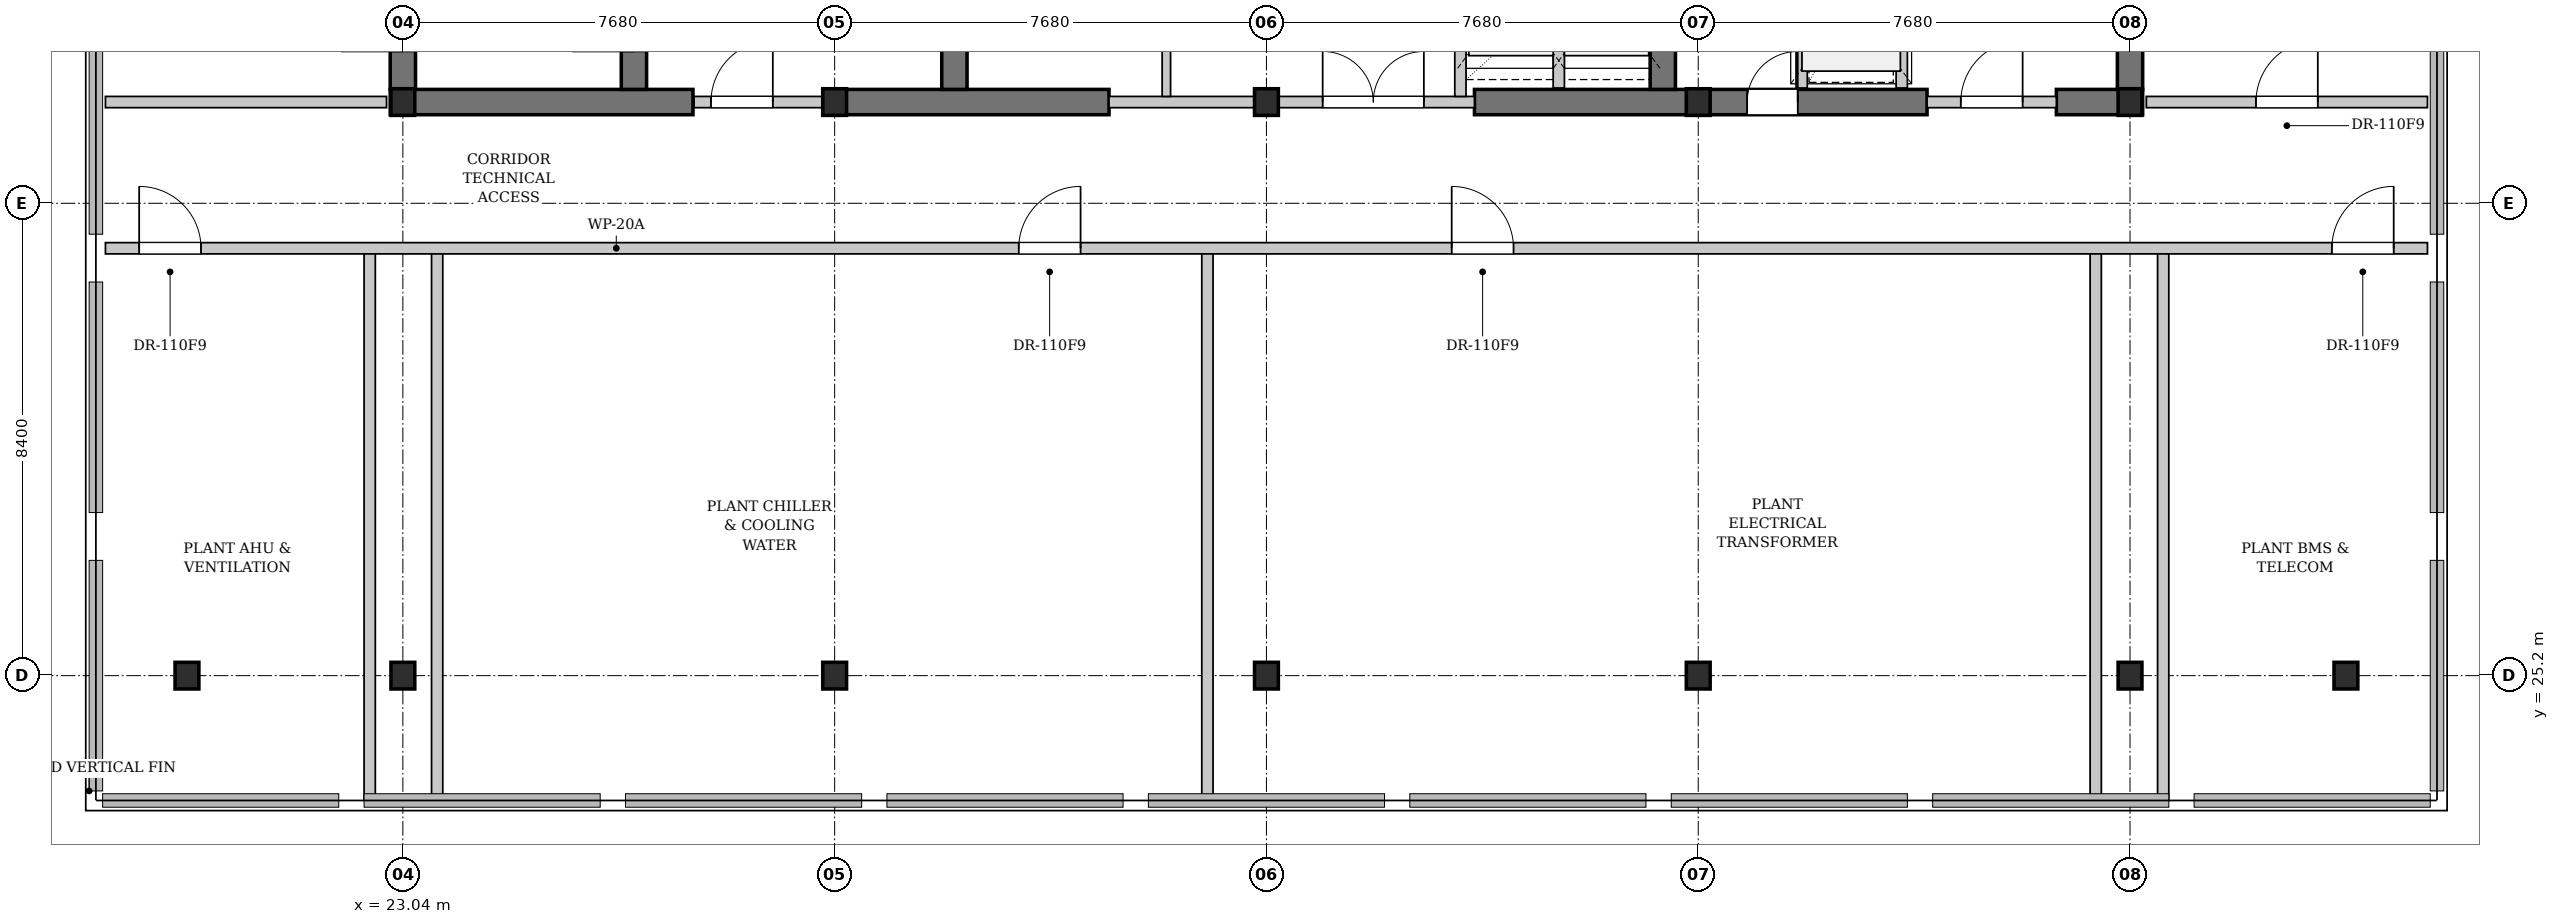
"""IFC4 building model, lengths in metres.
Left out: names, types, materials, properties, quantities, classifications, styles, units other than length and angle.
Written with IfcOpenShell. Run it as: python <this file> out.ifc"""

import sys

from ifc_helpers import new_model, si_unit, direction, frame, frame_2d, origin, origin_2d, place, context, subcontext, project, spatial, rectangle, i_section, extrude, element, fill, save


model = new_model("IFC4")
c1 = context("Model", 3, precision=1e-05, world=origin(), true_north=direction((0.0, 1.0)))
c2 = subcontext(c1, "Body", "Model", "MODEL_VIEW")
j1 = project(units=[si_unit("LENGTHUNIT", "METRE"), si_unit("PLANEANGLEUNIT", "RADIAN")], contexts=[c1])
p1 = place(None, origin())
s1 = spatial("IfcSite", under=j1, at=p1, CompositionType="ELEMENT")
p2 = place(p1, origin())
s2 = spatial("IfcBuilding", under=s1, at=p2, CompositionType="ELEMENT")
p3 = place(p2, frame((0.0, 0.0, 141.2)))
s3 = spatial("IfcBuildingStorey", under=s2, at=p3, CompositionType="ELEMENT", Elevation=141.2)
p4 = place(p3, frame((22.815, 35.4, 0.0), z_axis=(0.0, 0.0, 1.0), x_axis=(1.0, 0.0, 0.0)))
e1 = element("IfcWall", 1, at=p4, inside=s3, PredefinedType="SHEAR", context=c2, shape_type="SweptSolid", body=[
    extrude(rectangle(XDim=5.385, YDim=0.45, at=frame_2d((2.692, 0.0))), origin(), (0.0, 0.0, 1.0), 3.48),
])
p5 = place(p3, frame((30.72, 35.4, 0.0), z_axis=(0.0, 0.0, 1.0), x_axis=(1.0, 0.0, 0.0)))
e2 = element("IfcWall", 2, at=p5, inside=s3, PredefinedType="SHEAR", context=c2, shape_type="SweptSolid", body=[
    extrude(rectangle(XDim=4.88, YDim=0.45, at=frame_2d((2.44, 0.0))), origin(), (0.0, 0.0, 1.0), 3.48),
])
p6 = place(p3, frame((42.1, 35.4, 0.0), z_axis=(0.0, 0.0, 1.0), x_axis=(1.0, 0.0, 0.0)))
e3 = element("IfcWall", 3, at=p6, inside=s3, PredefinedType="SHEAR", context=c2, shape_type="SweptSolid", body=[
    extrude(rectangle(XDim=8.05, YDim=0.45, at=frame_2d((4.025, 0.0))), origin(), (0.0, 0.0, 1.0), 3.48),
])
p7 = place(p6, frame((4.85, 0.0, 0.0)))
e4 = element("IfcOpeningElement", 4, at=p7, cuts=e3, PredefinedType="OPENING", context=c2, shape_type="SweptSolid", body=[
    extrude(rectangle(XDim=0.9, YDim=2.15, at=frame_2d((0.45, 1.075))), frame((0.0, 0.235, 0.0), z_axis=(0.0, -1.0, 0.0), x_axis=(1.0, 0.0, 0.0)), (0.0, 0.0, 1.0), 0.47),
])
p8 = place(p3, frame((52.45, 35.4, 0.0), z_axis=(0.0, 0.0, 1.0), x_axis=(1.0, 0.0, 0.0)))
e5 = element("IfcWall", 5, at=p8, inside=s3, PredefinedType="SHEAR", context=c2, shape_type="SweptSolid", body=[
    extrude(rectangle(XDim=1.535, YDim=0.45, at=frame_2d((0.768, 0.0))), origin(), (0.0, 0.0, 1.0), 3.48),
])
p9 = place(p3, frame((23.04, 35.625, 0.0), z_axis=(0.0, 0.0, 1.0), x_axis=(0.0, 1.0, 0.0)))
e6 = element("IfcWall", 6, at=p9, inside=s3, PredefinedType="SHEAR", context=c2, shape_type="SweptSolid", body=[
    extrude(rectangle(XDim=10.35, YDim=0.45, at=frame_2d((5.175, 0.0))), origin(), (0.0, 0.0, 1.0), 3.48),
])
p10 = place(p9, frame((0.675, 0.0, 0.0)))
e7 = element("IfcOpeningElement", 7, at=p10, cuts=e6, PredefinedType="OPENING", context=c2, shape_type="SweptSolid", body=[
    extrude(rectangle(XDim=1.1, YDim=2.15, at=frame_2d((0.55, 1.075))), frame((0.0, 0.235, 0.0), z_axis=(0.0, -1.0, 0.0), x_axis=(1.0, 0.0, 0.0)), (0.0, 0.0, 1.0), 0.47),
])
p11 = place(p3, frame((27.15, 35.625, 0.0), z_axis=(0.0, 0.0, 1.0), x_axis=(0.0, 1.0, 0.0)))
e8 = element("IfcWall", 8, at=p11, inside=s3, PredefinedType="SHEAR", context=c2, shape_type="SweptSolid", body=[
    extrude(rectangle(XDim=10.35, YDim=0.45, at=frame_2d((5.175, 0.0))), origin(), (0.0, 0.0, 1.0), 3.48),
])
p12 = place(p11, frame((0.675, 0.0, 0.0)))
e9 = element("IfcOpeningElement", 9, at=p12, cuts=e8, PredefinedType="OPENING", context=c2, shape_type="SweptSolid", body=[
    extrude(rectangle(XDim=1.1, YDim=2.15, at=frame_2d((0.55, 1.075))), frame((0.0, 0.235, 0.0), z_axis=(0.0, -1.0, 0.0), x_axis=(1.0, 0.0, 0.0)), (0.0, 0.0, 1.0), 0.47),
])
for number, where, z_axis, x_axis in (
    (10, (32.85, 35.625, 0.0), (0.0, 0.0, 1.0), (0.0, 1.0, 0.0)),
    (11, (45.45, 35.625, 0.0), (0.0, 0.0, 1.0), (0.0, 1.0, 0.0)),
    (12, (53.76, 35.625, 0.0), (0.0, 0.0, 1.0), (0.0, 1.0, 0.0)),
):
    element("IfcWall", number, at=place(p3, frame(where, z_axis=z_axis, x_axis=x_axis)), inside=s3, PredefinedType="SHEAR", context=c2, shape_type="SweptSolid", body=[
        extrude(rectangle(XDim=10.35, YDim=0.45, at=frame_2d((5.175, 0.0))), origin(), (0.0, 0.0, 1.0), 3.48),
    ])
for number, where, z_axis, x_axis in (
    (13, (23.04, 35.4, 0.0), (0.0, 0.0, 1.0), (1.0, 0.0, 0.0)),
    (14, (23.04, 25.2, 0.0), (0.0, 0.0, 1.0), (1.0, 0.0, 0.0)),
    (15, (30.72, 35.4, 0.0), (0.0, 0.0, 1.0), (1.0, 0.0, 0.0)),
    (16, (30.72, 25.2, 0.0), (0.0, 0.0, 1.0), (1.0, 0.0, 0.0)),
    (17, (38.4, 35.4, 0.0), (0.0, 0.0, 1.0), (1.0, 0.0, 0.0)),
    (18, (38.4, 25.2, 0.0), (0.0, 0.0, 1.0), (1.0, 0.0, 0.0)),
    (19, (46.08, 35.4, 0.0), (0.0, 0.0, 1.0), (1.0, 0.0, 0.0)),
    (20, (46.08, 25.2, 0.0), (0.0, 0.0, 1.0), (1.0, 0.0, 0.0)),
    (21, (53.76, 35.4, 0.0), (0.0, 0.0, 1.0), (1.0, 0.0, 0.0)),
    (22, (53.76, 25.2, 0.0), (0.0, 0.0, 1.0), (1.0, 0.0, 0.0)),
    (23, (19.2, 25.2, 0.0), (0.0, 0.0, 1.0), (1.0, 0.0, 0.0)),
    (24, (57.6, 25.2, 0.0), (0.0, 0.0, 1.0), (1.0, 0.0, 0.0)),
):
    element("IfcColumn", number, at=place(p3, frame(where, z_axis=z_axis, x_axis=x_axis)), inside=s3, PredefinedType="COLUMN", context=c2, shape_type="SweptSolid", body=[
        extrude(i_section(OverallWidth=0.424, OverallDepth=0.474, WebThickness=0.047, FlangeThickness=0.077, FilletRadius=0.015, at=origin_2d()), origin(), (0.0, 0.0, 1.0), 3.9),
    ])
p13 = place(p3, frame((28.22, 35.4, 0.0), z_axis=(0.0, 0.0, 1.0), x_axis=(1.0, 0.0, 0.0)))
e25 = element("IfcWall", 25, at=p13, inside=s3, PredefinedType="PARTITIONING", context=c2, shape_type="SweptSolid", body=[
    extrude(rectangle(XDim=2.5, YDim=0.2, at=frame_2d((1.25, 0.0))), origin(), (0.0, 0.0, 1.0), 2.565),
])
p14 = place(p13, frame((0.3, 0.0, 0.0)))
e26 = element("IfcOpeningElement", 26, at=p14, cuts=e25, PredefinedType="OPENING", context=c2, shape_type="SweptSolid", body=[
    extrude(rectangle(XDim=1.1, YDim=2.15, at=frame_2d((0.55, 1.075))), frame((0.0, 0.11, 0.0), z_axis=(0.0, -1.0, 0.0), x_axis=(1.0, 0.0, 0.0)), (0.0, 0.0, 1.0), 0.22),
])
p15 = place(p3, frame((35.6, 35.4, 0.0), z_axis=(0.0, 0.0, 1.0), x_axis=(1.0, 0.0, 0.0)))
e27 = element("IfcWall", 27, at=p15, inside=s3, PredefinedType="PARTITIONING", context=c2, shape_type="SweptSolid", body=[
    extrude(rectangle(XDim=6.5, YDim=0.2, at=frame_2d((3.25, 0.0))), origin(), (0.0, 0.0, 1.0), 2.565),
])
p16 = place(p15, frame((3.8, 0.0, 0.0)))
e28 = element("IfcOpeningElement", 28, at=p16, cuts=e27, PredefinedType="OPENING", context=c2, shape_type="SweptSolid", body=[
    extrude(rectangle(XDim=1.8, YDim=2.3, at=frame_2d((0.9, 1.15))), frame((0.0, 0.11, 0.0), z_axis=(0.0, -1.0, 0.0), x_axis=(1.0, 0.0, 0.0)), (0.0, 0.0, 1.0), 0.22),
])
p17 = place(p3, frame((36.62, 35.5, 0.0), z_axis=(0.0, 0.0, 1.0), x_axis=(0.0, 1.0, 0.0)))
e29 = element("IfcWall", 29, at=p17, inside=s3, PredefinedType="PARTITIONING", context=c2, shape_type="SweptSolid", body=[
    extrude(rectangle(XDim=10.42, YDim=0.15, at=frame_2d((5.21, 0.0))), origin(), (0.0, 0.0, 1.0), 3.48),
])
p18 = place(p17, frame((3.92, 0.0, 0.0)))
e30 = element("IfcOpeningElement", 30, at=p18, cuts=e29, PredefinedType="OPENING", context=c2, shape_type="SweptSolid", body=[
    extrude(rectangle(XDim=0.9, YDim=2.15, at=frame_2d((0.45, 1.075))), frame((0.0, 0.085, 0.0), z_axis=(0.0, -1.0, 0.0), x_axis=(1.0, 0.0, 0.0)), (0.0, 0.0, 1.0), 0.17),
])
p19 = place(p17, frame((5.85, 0.0, 0.0)))
e31 = element("IfcOpeningElement", 31, at=p19, cuts=e29, PredefinedType="OPENING", context=c2, shape_type="SweptSolid", body=[
    extrude(rectangle(XDim=0.9, YDim=2.15, at=frame_2d((0.45, 1.075))), frame((0.0, 0.085, 0.0), z_axis=(0.0, -1.0, 0.0), x_axis=(1.0, 0.0, 0.0)), (0.0, 0.0, 1.0), 0.17),
])
p20 = place(p3, frame((43.6, 35.65, 0.0), z_axis=(0.0, 0.0, 1.0), x_axis=(0.0, 1.0, 0.0)))
e32 = element("IfcWall", 32, at=p20, inside=s3, PredefinedType="PARTITIONING", context=c2, shape_type="SweptSolid", body=[
    extrude(rectangle(XDim=3.25, YDim=0.2, at=frame_2d((1.625, 0.0))), origin(), (0.0, 0.0, 1.0), 3.48),
])
p21 = place(p3, frame((41.85, 35.5, 0.0), z_axis=(0.0, 0.0, 1.0), x_axis=(0.0, 1.0, 0.0)))
e33 = element("IfcWall", 33, at=p21, inside=s3, PredefinedType="PARTITIONING", context=c2, shape_type="SweptSolid", body=[
    extrude(rectangle(XDim=3.4, YDim=0.2, at=frame_2d((1.7, 0.0))), origin(), (0.0, 0.0, 1.0), 3.48),
])
p22 = place(p3, frame((50.15, 35.4, 0.0), z_axis=(0.0, 0.0, 1.0), x_axis=(1.0, 0.0, 0.0)))
e34 = element("IfcWall", 34, at=p22, inside=s3, PredefinedType="PARTITIONING", context=c2, shape_type="SweptSolid", body=[
    extrude(rectangle(XDim=2.3, YDim=0.2, at=frame_2d((1.15, 0.0))), origin(), (0.0, 0.0, 1.0), 2.565),
])
p23 = place(p22, frame((0.6, 0.0, 0.0)))
e35 = element("IfcOpeningElement", 35, at=p23, cuts=e34, PredefinedType="OPENING", context=c2, shape_type="SweptSolid", body=[
    extrude(rectangle(XDim=1.1, YDim=2.15, at=frame_2d((0.55, 1.075))), frame((0.0, 0.11, 0.0), z_axis=(0.0, -1.0, 0.0), x_axis=(1.0, 0.0, 0.0)), (0.0, 0.0, 1.0), 0.22),
])
p24 = place(p3, frame((49.7, 35.65, 0.0), z_axis=(0.0, 0.0, 1.0), x_axis=(0.0, 1.0, 0.0)))
e36 = element("IfcWall", 36, at=p24, inside=s3, PredefinedType="PARTITIONING", context=c2, shape_type="SweptSolid", body=[
    extrude(rectangle(XDim=3.15, YDim=0.2, at=frame_2d((1.575, 0.0))), origin(), (0.0, 0.0, 1.0), 3.48),
])
p25 = place(p24, frame((0.85, 0.0, 0.0)))
e37 = element("IfcOpeningElement", 37, at=p25, cuts=e36, PredefinedType="OPENING", context=c2, shape_type="SweptSolid", body=[
    extrude(rectangle(XDim=1.2, YDim=2.2, at=frame_2d((0.6, 1.1))), frame((0.0, 0.11, 0.0), z_axis=(0.0, -1.0, 0.0), x_axis=(1.0, 0.0, 0.0)), (0.0, 0.0, 1.0), 0.22),
])
p26 = place(p3, frame((47.92, 35.65, 0.0), z_axis=(0.0, 0.0, 1.0), x_axis=(0.0, 1.0, 0.0)))
e38 = element("IfcWall", 38, at=p26, inside=s3, PredefinedType="PARTITIONING", context=c2, shape_type="SweptSolid", body=[
    extrude(rectangle(XDim=3.15, YDim=0.2, at=frame_2d((1.575, 0.0))), origin(), (0.0, 0.0, 1.0), 3.48),
])
p27 = place(p3, frame((17.75, 35.4, 0.0), z_axis=(0.0, 0.0, 1.0), x_axis=(1.0, 0.0, 0.0)))
e39 = element("IfcWall", 39, at=p27, inside=s3, PredefinedType="PARTITIONING", context=c2, shape_type="SweptSolid", body=[
    extrude(rectangle(XDim=5.0, YDim=0.2, at=frame_2d((2.5, 0.0))), origin(), (0.0, 0.0, 1.0), 3.48),
])
p28 = place(p3, frame((54.05, 35.4, 0.0), z_axis=(0.0, 0.0, 1.0), x_axis=(1.0, 0.0, 0.0)))
e40 = element("IfcWall", 40, at=p28, inside=s3, PredefinedType="PARTITIONING", context=c2, shape_type="SweptSolid", body=[
    extrude(rectangle(XDim=5.0, YDim=0.2, at=frame_2d((2.5, 0.0))), origin(), (0.0, 0.0, 1.0), 3.48),
])
p29 = place(p28, frame((1.95, 0.0, 0.0)))
e41 = element("IfcOpeningElement", 41, at=p29, cuts=e40, PredefinedType="OPENING", context=c2, shape_type="SweptSolid", body=[
    extrude(rectangle(XDim=1.1, YDim=2.15, at=frame_2d((0.55, 1.075))), frame((0.0, 0.11, 0.0), z_axis=(0.0, -1.0, 0.0), x_axis=(1.0, 0.0, 0.0)), (0.0, 0.0, 1.0), 0.22),
])
for number, where, z_axis, x_axis in (
    (42, (22.45, 22.98, 0.0), (0.0, 0.0, 1.0), (0.0, 1.0, 0.0)),
    (43, (23.65, 22.98, 0.0), (0.0, 0.0, 1.0), (0.0, 1.0, 0.0)),
    (44, (37.35, 22.98, 0.0), (0.0, 0.0, 1.0), (0.0, 1.0, 0.0)),
    (45, (53.15, 22.98, 0.0), (0.0, 0.0, 1.0), (0.0, 1.0, 0.0)),
    (46, (54.35, 22.98, 0.0), (0.0, 0.0, 1.0), (0.0, 1.0, 0.0)),
):
    element("IfcWall", number, at=place(p3, frame(where, z_axis=z_axis, x_axis=x_axis)), inside=s3, PredefinedType="PARTITIONING", context=c2, shape_type="SweptSolid", body=[
        extrude(rectangle(XDim=9.82, YDim=0.2, at=frame_2d((4.91, 0.0))), origin(), (0.0, 0.0, 1.0), 3.48),
    ])
p30 = place(p3, frame((17.75, 32.8, 0.0), z_axis=(0.0, 0.0, 1.0), x_axis=(1.0, 0.0, 0.0)))
e47 = element("IfcWall", 47, at=p30, inside=s3, PredefinedType="PARTITIONING", context=c2, shape_type="SweptSolid", body=[
    extrude(rectangle(XDim=41.3, YDim=0.2, at=frame_2d((20.65, 0.0))), origin(), (0.0, 0.0, 1.0), 3.48),
])
p31 = place(p30, frame((0.6, 0.0, 0.0)))
e48 = element("IfcOpeningElement", 48, at=p31, cuts=e47, PredefinedType="OPENING", context=c2, shape_type="SweptSolid", body=[
    extrude(rectangle(XDim=1.1, YDim=2.15, at=frame_2d((0.55, 1.075))), frame((0.0, 0.11, 0.0), z_axis=(0.0, -1.0, 0.0), x_axis=(1.0, 0.0, 0.0)), (0.0, 0.0, 1.0), 0.22),
])
p32 = place(p30, frame((16.244, 0.0, 0.0)))
e49 = element("IfcOpeningElement", 49, at=p32, cuts=e47, PredefinedType="OPENING", context=c2, shape_type="SweptSolid", body=[
    extrude(rectangle(XDim=1.1, YDim=2.15, at=frame_2d((0.55, 1.075))), frame((0.0, 0.11, 0.0), z_axis=(0.0, -1.0, 0.0), x_axis=(1.0, 0.0, 0.0)), (0.0, 0.0, 1.0), 0.22),
])
p33 = place(p30, frame((23.945, 0.0, 0.0)))
e50 = element("IfcOpeningElement", 50, at=p33, cuts=e47, PredefinedType="OPENING", context=c2, shape_type="SweptSolid", body=[
    extrude(rectangle(XDim=1.1, YDim=2.15, at=frame_2d((0.55, 1.075))), frame((0.0, 0.11, 0.0), z_axis=(0.0, -1.0, 0.0), x_axis=(1.0, 0.0, 0.0)), (0.0, 0.0, 1.0), 0.22),
])
p34 = place(p30, frame((39.6, 0.0, 0.0)))
e51 = element("IfcOpeningElement", 51, at=p34, cuts=e47, PredefinedType="OPENING", context=c2, shape_type="SweptSolid", body=[
    extrude(rectangle(XDim=1.1, YDim=2.15, at=frame_2d((0.55, 1.075))), frame((0.0, 0.11, 0.0), z_axis=(0.0, -1.0, 0.0), x_axis=(1.0, 0.0, 0.0)), (0.0, 0.0, 1.0), 0.22),
])
p35 = place(p14, origin())
e52 = element("IfcDoor", 52, at=p35, inside=s3, OperationType="SINGLE_SWING_RIGHT", PredefinedType="DOOR", context=c2, shape_type="SweptSolid", body=[
    extrude(rectangle(XDim=1.1, YDim=2.15, at=frame_2d((0.55, 1.075))), frame((0.0, 0.025, 0.0), z_axis=(0.0, -1.0, 0.0), x_axis=(1.0, 0.0, 0.0)), (0.0, 0.0, 1.0), 0.05),
])
fill(e26, e52)
p36 = place(p16, origin())
e53 = element("IfcDoor", 53, at=p36, inside=s3, OperationType="DOUBLE_DOOR_SINGLE_SWING", PredefinedType="DOOR", context=c2, shape_type="SweptSolid", body=[
    extrude(rectangle(XDim=1.8, YDim=2.3, at=frame_2d((0.9, 1.15))), frame((0.0, 0.025, 0.0), z_axis=(0.0, -1.0, 0.0), x_axis=(1.0, 0.0, 0.0)), (0.0, 0.0, 1.0), 0.05),
])
fill(e28, e53)
p37 = place(p23, origin())
e54 = element("IfcDoor", 54, at=p37, inside=s3, OperationType="SINGLE_SWING_RIGHT", PredefinedType="DOOR", context=c2, shape_type="SweptSolid", body=[
    extrude(rectangle(XDim=1.1, YDim=2.15, at=frame_2d((0.55, 1.075))), frame((0.0, 0.025, 0.0), z_axis=(0.0, -1.0, 0.0), x_axis=(1.0, 0.0, 0.0)), (0.0, 0.0, 1.0), 0.05),
])
fill(e35, e54)
p38 = place(p29, origin())
e55 = element("IfcDoor", 55, at=p38, inside=s3, OperationType="SINGLE_SWING_RIGHT", PredefinedType="DOOR", context=c2, shape_type="SweptSolid", body=[
    extrude(rectangle(XDim=1.1, YDim=2.15, at=frame_2d((0.55, 1.075))), frame((0.0, 0.025, 0.0), z_axis=(0.0, -1.0, 0.0), x_axis=(1.0, 0.0, 0.0)), (0.0, 0.0, 1.0), 0.05),
])
fill(e41, e55)
p39 = place(p31, origin())
e56 = element("IfcDoor", 56, at=p39, inside=s3, OperationType="SINGLE_SWING_LEFT", PredefinedType="DOOR", context=c2, shape_type="SweptSolid", body=[
    extrude(rectangle(XDim=1.1, YDim=2.15, at=frame_2d((0.55, 1.075))), frame((0.0, 0.025, 0.0), z_axis=(0.0, -1.0, 0.0), x_axis=(1.0, 0.0, 0.0)), (0.0, 0.0, 1.0), 0.05),
])
fill(e48, e56)
p40 = place(p32, origin())
e57 = element("IfcDoor", 57, at=p40, inside=s3, OperationType="SINGLE_SWING_RIGHT", PredefinedType="DOOR", context=c2, shape_type="SweptSolid", body=[
    extrude(rectangle(XDim=1.1, YDim=2.15, at=frame_2d((0.55, 1.075))), frame((0.0, 0.025, 0.0), z_axis=(0.0, -1.0, 0.0), x_axis=(1.0, 0.0, 0.0)), (0.0, 0.0, 1.0), 0.05),
])
fill(e49, e57)
p41 = place(p33, origin())
e58 = element("IfcDoor", 58, at=p41, inside=s3, OperationType="SINGLE_SWING_LEFT", PredefinedType="DOOR", context=c2, shape_type="SweptSolid", body=[
    extrude(rectangle(XDim=1.1, YDim=2.15, at=frame_2d((0.55, 1.075))), frame((0.0, 0.025, 0.0), z_axis=(0.0, -1.0, 0.0), x_axis=(1.0, 0.0, 0.0)), (0.0, 0.0, 1.0), 0.05),
])
fill(e50, e58)
p42 = place(p34, origin())
e59 = element("IfcDoor", 59, at=p42, inside=s3, OperationType="SINGLE_SWING_RIGHT", PredefinedType="DOOR", context=c2, shape_type="SweptSolid", body=[
    extrude(rectangle(XDim=1.1, YDim=2.15, at=frame_2d((0.55, 1.075))), frame((0.0, 0.025, 0.0), z_axis=(0.0, -1.0, 0.0), x_axis=(1.0, 0.0, 0.0)), (0.0, 0.0, 1.0), 0.05),
])
fill(e51, e59)
p43 = place(p7, origin())
e60 = element("IfcDoor", 60, at=p43, inside=s3, OperationType="SINGLE_SWING_RIGHT", PredefinedType="DOOR", context=c2, shape_type="SweptSolid", body=[
    extrude(rectangle(XDim=0.9, YDim=2.15, at=frame_2d((0.45, 1.075))), frame((0.0, 0.025, 0.0), z_axis=(0.0, -1.0, 0.0), x_axis=(1.0, 0.0, 0.0)), (0.0, 0.0, 1.0), 0.05),
])
fill(e4, e60)
save(model, sys.argv[1])
